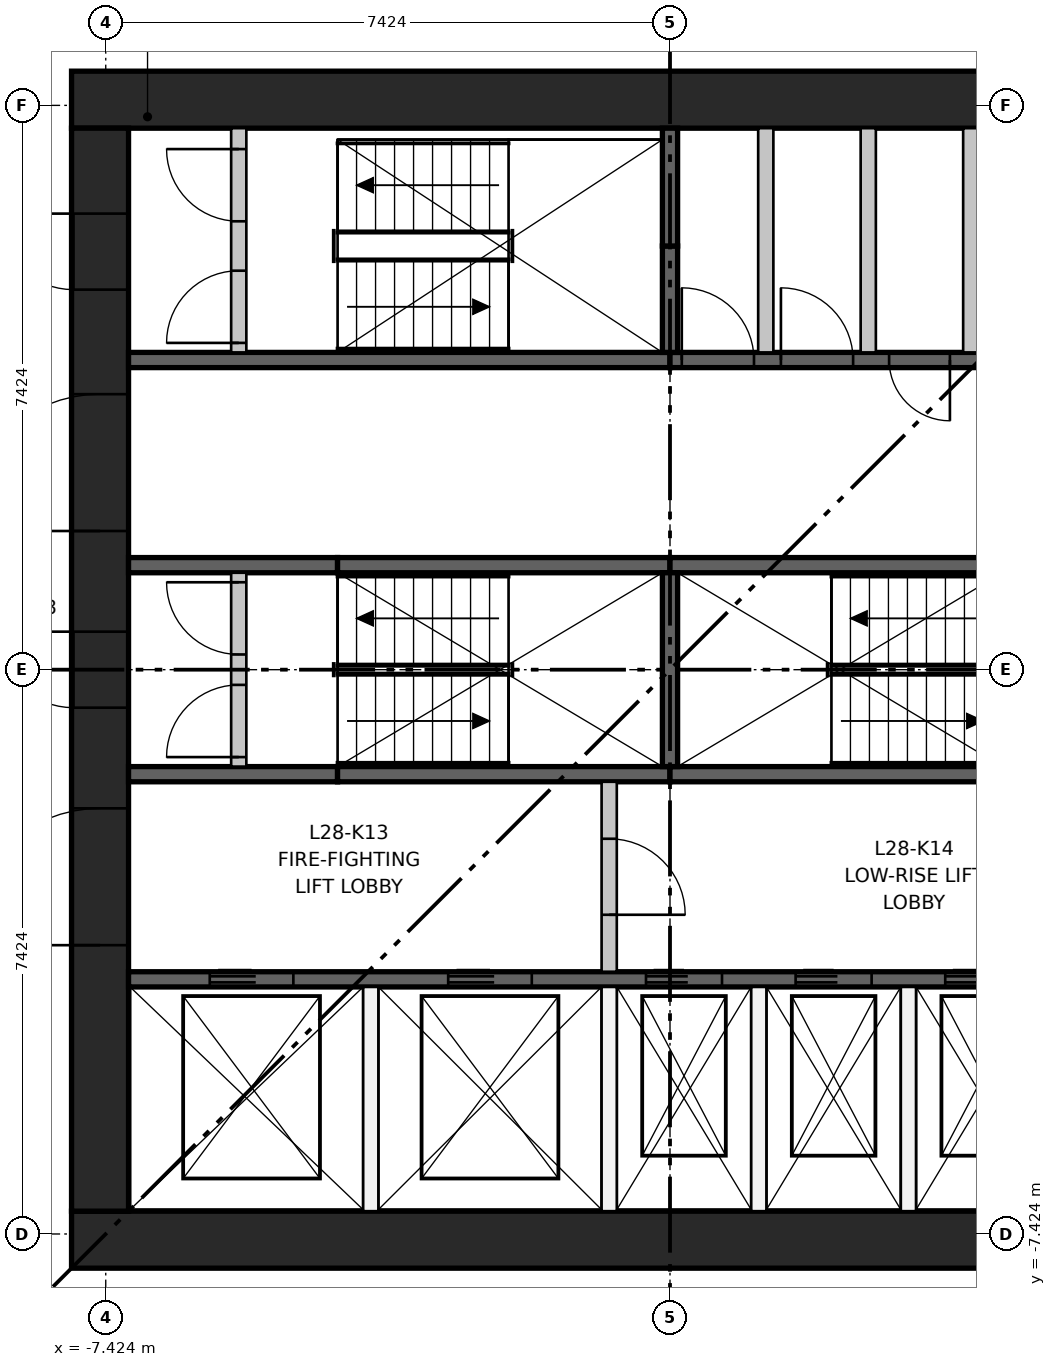
"""IFC4 building model, lengths in metres.
Left out: names, types, materials, properties, quantities, classifications, styles, units other than length and angle.
Written with IfcOpenShell. Run it as: python <this file> out.ifc"""

import sys

from ifc_helpers import new_model, si_unit, direction, frame, frame_2d, origin, place, context, subcontext, project, spatial, rectangle, extrude, element, fill, save


model = new_model("IFC4")
c1 = context("Model", 3, precision=1e-05, world=origin(), true_north=direction((0.0, 1.0)))
c2 = subcontext(c1, "Body", "Model", "MODEL_VIEW")
j1 = project(units=[si_unit("LENGTHUNIT", "METRE"), si_unit("PLANEANGLEUNIT", "RADIAN")], contexts=[c1])
p1 = place(None, origin())
s1 = spatial("IfcSite", under=j1, at=p1, CompositionType="ELEMENT")
p2 = place(p1, origin())
s2 = spatial("IfcBuilding", under=s1, at=p2, CompositionType="ELEMENT")
p3 = place(p2, frame((0.0, 0.0, 109.25)))
s3 = spatial("IfcBuildingStorey", under=s2, at=p3, CompositionType="ELEMENT", Elevation=109.25)
for number, where, z_axis, x_axis in (
    (1, (-7.874, -7.499, 0.0), (0.0, 0.0, 1.0), (1.0, 0.0, 0.0)),
    (2, (-7.874, 7.499, 0.0), (0.0, 0.0, 1.0), (1.0, 0.0, 0.0)),
):
    element("IfcWall", number, at=place(p3, frame(where, z_axis=z_axis, x_axis=x_axis)), inside=s3, PredefinedType="SHEAR", context=c2, shape_type="SweptSolid", body=[
        extrude(rectangle(XDim=15.748, YDim=0.75, at=frame_2d((7.874, 0.0))), origin(), (0.0, 0.0, 1.0), 3.65),
    ])
p4 = place(p3, frame((-7.499, -7.124, 0.0), z_axis=(0.0, 0.0, 1.0), x_axis=(0.0, 1.0, 0.0)))
e3 = element("IfcWall", 3, at=p4, inside=s3, PredefinedType="SHEAR", context=c2, shape_type="SweptSolid", body=[
    extrude(rectangle(XDim=14.248, YDim=0.75, at=frame_2d((7.124, 0.0))), origin(), (0.0, 0.0, 1.0), 3.65),
])
p5 = place(p4, frame((6.624, 0.0, 0.0)))
e4 = element("IfcOpeningElement", 4, at=p5, cuts=e3, PredefinedType="OPENING", context=c2, shape_type="SweptSolid", body=[
    extrude(rectangle(XDim=1.0, YDim=2.1, at=frame_2d((0.5, 1.05))), frame((0.0, 0.385, 0.0), z_axis=(0.0, -1.0, 0.0), x_axis=(1.0, 0.0, 0.0)), (0.0, 0.0, 1.0), 0.77),
])
p6 = place(p4, frame((3.5, 0.0, 0.0)))
e5 = element("IfcOpeningElement", 5, at=p6, cuts=e3, PredefinedType="OPENING", context=c2, shape_type="SweptSolid", body=[
    extrude(rectangle(XDim=1.8, YDim=2.1, at=frame_2d((0.9, 1.05))), frame((0.0, 0.385, 0.0), z_axis=(0.0, -1.0, 0.0), x_axis=(1.0, 0.0, 0.0)), (0.0, 0.0, 1.0), 0.77),
])
p7 = place(p4, frame((8.948, 0.0, 0.0)))
e6 = element("IfcOpeningElement", 6, at=p7, cuts=e3, PredefinedType="OPENING", context=c2, shape_type="SweptSolid", body=[
    extrude(rectangle(XDim=1.8, YDim=2.1, at=frame_2d((0.9, 1.05))), frame((0.0, 0.385, 0.0), z_axis=(0.0, -1.0, 0.0), x_axis=(1.0, 0.0, 0.0)), (0.0, 0.0, 1.0), 0.77),
])
p8 = place(p4, frame((12.124, 0.0, 0.0)))
e7 = element("IfcOpeningElement", 7, at=p8, cuts=e3, PredefinedType="OPENING", context=c2, shape_type="SweptSolid", body=[
    extrude(rectangle(XDim=1.0, YDim=2.1, at=frame_2d((0.5, 1.05))), frame((0.0, 0.385, 0.0), z_axis=(0.0, -1.0, 0.0), x_axis=(1.0, 0.0, 0.0)), (0.0, 0.0, 1.0), 0.77),
])
p9 = place(p3, frame((-7.124, -4.074, 0.0), z_axis=(0.0, 0.0, 1.0), x_axis=(1.0, 0.0, 0.0)))
e8 = element("IfcWall", 8, at=p9, inside=s3, PredefinedType="SHEAR", context=c2, shape_type="SweptSolid", body=[
    extrude(rectangle(XDim=14.248, YDim=0.2, at=frame_2d((7.124, 0.0))), origin(), (0.0, 0.0, 1.0), 3.3),
])
p10 = place(p9, frame((1.069, 0.0, 0.0)))
e9 = element("IfcOpeningElement", 9, at=p10, cuts=e8, PredefinedType="OPENING", context=c2, shape_type="SweptSolid", body=[
    extrude(rectangle(XDim=1.1, YDim=2.1, at=frame_2d((0.55, 1.05))), frame((0.0, 0.11, 0.0), z_axis=(0.0, -1.0, 0.0), x_axis=(1.0, 0.0, 0.0)), (0.0, 0.0, 1.0), 0.22),
])
p11 = place(p9, frame((4.206, 0.0, 0.0)))
e10 = element("IfcOpeningElement", 10, at=p11, cuts=e8, PredefinedType="OPENING", context=c2, shape_type="SweptSolid", body=[
    extrude(rectangle(XDim=1.1, YDim=2.1, at=frame_2d((0.55, 1.05))), frame((0.0, 0.11, 0.0), z_axis=(0.0, -1.0, 0.0), x_axis=(1.0, 0.0, 0.0)), (0.0, 0.0, 1.0), 0.22),
])
p12 = place(p9, frame((6.808, 0.0, 0.0)))
e11 = element("IfcOpeningElement", 11, at=p12, cuts=e8, PredefinedType="OPENING", context=c2, shape_type="SweptSolid", body=[
    extrude(rectangle(XDim=1.0, YDim=2.1, at=frame_2d((0.5, 1.05))), frame((0.0, 0.11, 0.0), z_axis=(0.0, -1.0, 0.0), x_axis=(1.0, 0.0, 0.0)), (0.0, 0.0, 1.0), 0.22),
])
p13 = place(p9, frame((8.777, 0.0, 0.0)))
e12 = element("IfcOpeningElement", 12, at=p13, cuts=e8, PredefinedType="OPENING", context=c2, shape_type="SweptSolid", body=[
    extrude(rectangle(XDim=1.0, YDim=2.1, at=frame_2d((0.5, 1.05))), frame((0.0, 0.11, 0.0), z_axis=(0.0, -1.0, 0.0), x_axis=(1.0, 0.0, 0.0)), (0.0, 0.0, 1.0), 0.22),
])
p14 = place(p9, frame((10.745, 0.0, 0.0)))
e13 = element("IfcOpeningElement", 13, at=p14, cuts=e8, PredefinedType="OPENING", context=c2, shape_type="SweptSolid", body=[
    extrude(rectangle(XDim=1.0, YDim=2.1, at=frame_2d((0.5, 1.05))), frame((0.0, 0.11, 0.0), z_axis=(0.0, -1.0, 0.0), x_axis=(1.0, 0.0, 0.0)), (0.0, 0.0, 1.0), 0.22),
])
p15 = place(p9, frame((12.714, 0.0, 0.0)))
e14 = element("IfcOpeningElement", 14, at=p15, cuts=e8, PredefinedType="OPENING", context=c2, shape_type="SweptSolid", body=[
    extrude(rectangle(XDim=1.0, YDim=2.1, at=frame_2d((0.5, 1.05))), frame((0.0, 0.11, 0.0), z_axis=(0.0, -1.0, 0.0), x_axis=(1.0, 0.0, 0.0)), (0.0, 0.0, 1.0), 0.22),
])
p16 = place(p3, frame((-7.124, 4.074, 0.0), z_axis=(0.0, 0.0, 1.0), x_axis=(1.0, 0.0, 0.0)))
e15 = element("IfcWall", 15, at=p16, inside=s3, PredefinedType="SHEAR", context=c2, shape_type="SweptSolid", body=[
    extrude(rectangle(XDim=7.124, YDim=0.2, at=frame_2d((3.562, 0.0))), origin(), (0.0, 0.0, 1.0), 3.3),
])
p17 = place(p3, frame((0.0, 4.074, 0.0), z_axis=(0.0, 0.0, 1.0), x_axis=(1.0, 0.0, 0.0)))
e16 = element("IfcWall", 16, at=p17, inside=s3, PredefinedType="SHEAR", context=c2, shape_type="SweptSolid", body=[
    extrude(rectangle(XDim=7.124, YDim=0.2, at=frame_2d((3.562, 0.0))), origin(), (0.0, 0.0, 1.0), 3.3),
])
p18 = place(p17, frame((0.155, 0.0, 0.0)))
e17 = element("IfcOpeningElement", 17, at=p18, cuts=e16, PredefinedType="OPENING", context=c2, shape_type="SweptSolid", body=[
    extrude(rectangle(XDim=0.95, YDim=2.1, at=frame_2d((0.475, 1.05))), frame((0.0, 0.11, 0.0), z_axis=(0.0, -1.0, 0.0), x_axis=(1.0, 0.0, 0.0)), (0.0, 0.0, 1.0), 0.22),
])
p19 = place(p17, frame((1.459, 0.0, 0.0)))
e18 = element("IfcOpeningElement", 18, at=p19, cuts=e16, PredefinedType="OPENING", context=c2, shape_type="SweptSolid", body=[
    extrude(rectangle(XDim=0.95, YDim=2.1, at=frame_2d((0.475, 1.05))), frame((0.0, 0.11, 0.0), z_axis=(0.0, -1.0, 0.0), x_axis=(1.0, 0.0, 0.0)), (0.0, 0.0, 1.0), 0.22),
])
p20 = place(p17, frame((2.883, 0.0, 0.0)))
e19 = element("IfcOpeningElement", 19, at=p20, cuts=e16, PredefinedType="OPENING", context=c2, shape_type="SweptSolid", body=[
    extrude(rectangle(XDim=0.8, YDim=2.1, at=frame_2d((0.4, 1.05))), frame((0.0, 0.11, 0.0), z_axis=(0.0, -1.0, 0.0), x_axis=(1.0, 0.0, 0.0)), (0.0, 0.0, 1.0), 0.22),
])
p21 = place(p17, frame((4.156, 0.0, 0.0)))
e20 = element("IfcOpeningElement", 20, at=p21, cuts=e16, PredefinedType="OPENING", context=c2, shape_type="SweptSolid", body=[
    extrude(rectangle(XDim=0.95, YDim=2.1, at=frame_2d((0.475, 1.05))), frame((0.0, 0.11, 0.0), z_axis=(0.0, -1.0, 0.0), x_axis=(1.0, 0.0, 0.0)), (0.0, 0.0, 1.0), 0.22),
])
p22 = place(p17, frame((5.79, 0.0, 0.0)))
e21 = element("IfcOpeningElement", 21, at=p22, cuts=e16, PredefinedType="OPENING", context=c2, shape_type="SweptSolid", body=[
    extrude(rectangle(XDim=0.8, YDim=2.1, at=frame_2d((0.4, 1.05))), frame((0.0, 0.11, 0.0), z_axis=(0.0, -1.0, 0.0), x_axis=(1.0, 0.0, 0.0)), (0.0, 0.0, 1.0), 0.22),
])
p23 = place(p3, frame((-7.124, -1.375, 0.0), z_axis=(0.0, 0.0, 1.0), x_axis=(1.0, 0.0, 0.0)))
e22 = element("IfcWall", 22, at=p23, inside=s3, PredefinedType="SHEAR", context=c2, shape_type="SweptSolid", body=[
    extrude(rectangle(XDim=2.75, YDim=0.2, at=frame_2d((1.375, 0.0))), origin(), (0.0, 0.0, 1.0), 3.3),
])
for number, where, z_axis, x_axis in (
    (23, (-4.374, -1.375, 0.0), (0.0, 0.0, 1.0), (1.0, 0.0, 0.0)),
    (24, (0.0, -1.375, 0.0), (0.0, 0.0, 1.0), (1.0, 0.0, 0.0)),
):
    element("IfcWall", number, at=place(p3, frame(where, z_axis=z_axis, x_axis=x_axis)), inside=s3, PredefinedType="SHEAR", context=c2, shape_type="SweptSolid", body=[
        extrude(rectangle(XDim=4.374, YDim=0.2, at=frame_2d((2.187, 0.0))), origin(), (0.0, 0.0, 1.0), 3.3),
    ])
p24 = place(p3, frame((-7.124, 1.375, 0.0), z_axis=(0.0, 0.0, 1.0), x_axis=(1.0, 0.0, 0.0)))
e25 = element("IfcWall", 25, at=p24, inside=s3, PredefinedType="SHEAR", context=c2, shape_type="SweptSolid", body=[
    extrude(rectangle(XDim=2.75, YDim=0.2, at=frame_2d((1.375, 0.0))), origin(), (0.0, 0.0, 1.0), 3.3),
])
for number, where, z_axis, x_axis in (
    (26, (-4.374, 1.375, 0.0), (0.0, 0.0, 1.0), (1.0, 0.0, 0.0)),
    (27, (0.0, 1.375, 0.0), (0.0, 0.0, 1.0), (1.0, 0.0, 0.0)),
):
    element("IfcWall", number, at=place(p3, frame(where, z_axis=z_axis, x_axis=x_axis)), inside=s3, PredefinedType="SHEAR", context=c2, shape_type="SweptSolid", body=[
        extrude(rectangle(XDim=4.374, YDim=0.2, at=frame_2d((2.187, 0.0))), origin(), (0.0, 0.0, 1.0), 3.3),
    ])
p25 = place(p3, frame((0.0, -1.275, 0.0), z_axis=(0.0, 0.0, 1.0), x_axis=(0.0, 1.0, 0.0)))
e28 = element("IfcWall", 28, at=p25, inside=s3, PredefinedType="SHEAR", context=c2, shape_type="SweptSolid", body=[
    extrude(rectangle(XDim=2.55, YDim=0.2, at=frame_2d((1.275, 0.0))), origin(), (0.0, 0.0, 1.0), 3.3),
])
for number, where, z_axis, x_axis in (
    (29, (-3.937, -7.124, 0.0), (0.0, 0.0, 1.0), (0.0, 1.0, 0.0)),
    (30, (-0.8, -7.124, 0.0), (0.0, 0.0, 1.0), (0.0, 1.0, 0.0)),
):
    element("IfcWall", number, at=place(p3, frame(where, z_axis=z_axis, x_axis=x_axis)), inside=s3, PredefinedType="PARTITIONING", context=c2, shape_type="SweptSolid", body=[
        extrude(rectangle(XDim=2.95, YDim=0.2, at=frame_2d((1.475, 0.0))), origin(), (0.0, 0.0, 1.0), 3.3),
    ])
p26 = place(p3, frame((-0.8, -3.974, 0.0), z_axis=(0.0, 0.0, 1.0), x_axis=(0.0, 1.0, 0.0)))
e31 = element("IfcWall", 31, at=p26, inside=s3, PredefinedType="PARTITIONING", context=c2, shape_type="SweptSolid", body=[
    extrude(rectangle(XDim=2.499, YDim=0.2, at=frame_2d((1.25, 0.0))), origin(), (0.0, 0.0, 1.0), 3.3),
])
p27 = place(p26, frame((0.75, 0.0, 0.0)))
e32 = element("IfcOpeningElement", 32, at=p27, cuts=e31, PredefinedType="OPENING", context=c2, shape_type="SweptSolid", body=[
    extrude(rectangle(XDim=1.0, YDim=2.1, at=frame_2d((0.5, 1.05))), frame((0.0, 0.11, 0.0), z_axis=(0.0, -1.0, 0.0), x_axis=(1.0, 0.0, 0.0)), (0.0, 0.0, 1.0), 0.22),
])
for number, where, z_axis, x_axis in (
    (33, (1.168, -7.124, 0.0), (0.0, 0.0, 1.0), (0.0, 1.0, 0.0)),
    (34, (3.137, -7.124, 0.0), (0.0, 0.0, 1.0), (0.0, 1.0, 0.0)),
):
    element("IfcWall", number, at=place(p3, frame(where, z_axis=z_axis, x_axis=x_axis)), inside=s3, PredefinedType="PARTITIONING", context=c2, shape_type="SweptSolid", body=[
        extrude(rectangle(XDim=2.95, YDim=0.2, at=frame_2d((1.475, 0.0))), origin(), (0.0, 0.0, 1.0), 3.3),
    ])
p28 = place(p3, frame((0.0, 4.174, 0.0), z_axis=(0.0, 0.0, 1.0), x_axis=(0.0, 1.0, 0.0)))
e35 = element("IfcWall", 35, at=p28, inside=s3, PredefinedType="SHEAR", context=c2, shape_type="SweptSolid", body=[
    extrude(rectangle(XDim=1.4, YDim=0.2, at=frame_2d((0.7, 0.0))), origin(), (0.0, 0.0, 1.0), 3.3),
])
p29 = place(p3, frame((0.0, 5.574, 0.0), z_axis=(0.0, 0.0, 1.0), x_axis=(0.0, 1.0, 0.0)))
e36 = element("IfcWall", 36, at=p29, inside=s3, PredefinedType="SHEAR", context=c2, shape_type="SweptSolid", body=[
    extrude(rectangle(XDim=1.55, YDim=0.2, at=frame_2d((0.775, 0.0))), origin(), (0.0, 0.0, 1.0), 3.3),
])
for number, where, z_axis, x_axis in (
    (37, (1.26, 4.174, 0.0), (0.0, 0.0, 1.0), (0.0, 1.0, 0.0)),
    (38, (2.609, 4.174, 0.0), (0.0, 0.0, 1.0), (0.0, 1.0, 0.0)),
    (39, (3.957, 4.174, 0.0), (0.0, 0.0, 1.0), (0.0, 1.0, 0.0)),
):
    element("IfcWall", number, at=place(p3, frame(where, z_axis=z_axis, x_axis=x_axis)), inside=s3, PredefinedType="PARTITIONING", context=c2, shape_type="SweptSolid", body=[
        extrude(rectangle(XDim=2.95, YDim=0.2, at=frame_2d((1.475, 0.0))), origin(), (0.0, 0.0, 1.0), 3.3),
    ])
p30 = place(p3, frame((-5.674, -1.275, 0.0), z_axis=(0.0, 0.0, 1.0), x_axis=(0.0, 1.0, 0.0)))
e40 = element("IfcWall", 40, at=p30, inside=s3, PredefinedType="PARTITIONING", context=c2, shape_type="SweptSolid", body=[
    extrude(rectangle(XDim=2.55, YDim=0.2, at=frame_2d((1.275, 0.0))), origin(), (0.0, 0.0, 1.0), 3.3),
])
p31 = place(p30, frame((0.125, 0.0, 0.0)))
e41 = element("IfcOpeningElement", 41, at=p31, cuts=e40, PredefinedType="OPENING", context=c2, shape_type="SweptSolid", body=[
    extrude(rectangle(XDim=0.95, YDim=2.1, at=frame_2d((0.475, 1.05))), frame((0.0, 0.11, 0.0), z_axis=(0.0, -1.0, 0.0), x_axis=(1.0, 0.0, 0.0)), (0.0, 0.0, 1.0), 0.22),
])
p32 = place(p30, frame((1.475, 0.0, 0.0)))
e42 = element("IfcOpeningElement", 42, at=p32, cuts=e40, PredefinedType="OPENING", context=c2, shape_type="SweptSolid", body=[
    extrude(rectangle(XDim=0.95, YDim=2.1, at=frame_2d((0.475, 1.05))), frame((0.0, 0.11, 0.0), z_axis=(0.0, -1.0, 0.0), x_axis=(1.0, 0.0, 0.0)), (0.0, 0.0, 1.0), 0.22),
])
p33 = place(p3, frame((-5.674, 4.174, 0.0), z_axis=(0.0, 0.0, 1.0), x_axis=(0.0, 1.0, 0.0)))
e43 = element("IfcWall", 43, at=p33, inside=s3, PredefinedType="PARTITIONING", context=c2, shape_type="SweptSolid", body=[
    extrude(rectangle(XDim=2.95, YDim=0.2, at=frame_2d((1.475, 0.0))), origin(), (0.0, 0.0, 1.0), 3.3),
])
p34 = place(p33, frame((0.125, 0.0, 0.0)))
e44 = element("IfcOpeningElement", 44, at=p34, cuts=e43, PredefinedType="OPENING", context=c2, shape_type="SweptSolid", body=[
    extrude(rectangle(XDim=0.95, YDim=2.1, at=frame_2d((0.475, 1.05))), frame((0.0, 0.11, 0.0), z_axis=(0.0, -1.0, 0.0), x_axis=(1.0, 0.0, 0.0)), (0.0, 0.0, 1.0), 0.22),
])
p35 = place(p33, frame((1.725, 0.0, 0.0)))
e45 = element("IfcOpeningElement", 45, at=p35, cuts=e43, PredefinedType="OPENING", context=c2, shape_type="SweptSolid", body=[
    extrude(rectangle(XDim=0.95, YDim=2.1, at=frame_2d((0.475, 1.05))), frame((0.0, 0.11, 0.0), z_axis=(0.0, -1.0, 0.0), x_axis=(1.0, 0.0, 0.0)), (0.0, 0.0, 1.0), 0.22),
])
p36 = place(p10, origin())
e46 = element("IfcDoor", 46, at=p36, inside=s3, OperationType="DOUBLE_DOOR_SLIDING", PredefinedType="DOOR", context=c2, shape_type="SweptSolid", body=[
    extrude(rectangle(XDim=1.1, YDim=2.1, at=frame_2d((0.55, 1.05))), frame((0.0, 0.025, 0.0), z_axis=(0.0, -1.0, 0.0), x_axis=(1.0, 0.0, 0.0)), (0.0, 0.0, 1.0), 0.05),
])
fill(e9, e46)
p37 = place(p11, origin())
e47 = element("IfcDoor", 47, at=p37, inside=s3, OperationType="DOUBLE_DOOR_SLIDING", PredefinedType="DOOR", context=c2, shape_type="SweptSolid", body=[
    extrude(rectangle(XDim=1.1, YDim=2.1, at=frame_2d((0.55, 1.05))), frame((0.0, 0.025, 0.0), z_axis=(0.0, -1.0, 0.0), x_axis=(1.0, 0.0, 0.0)), (0.0, 0.0, 1.0), 0.05),
])
fill(e10, e47)
p38 = place(p12, origin())
e48 = element("IfcDoor", 48, at=p38, inside=s3, OperationType="DOUBLE_DOOR_SLIDING", PredefinedType="DOOR", context=c2, shape_type="SweptSolid", body=[
    extrude(rectangle(XDim=1.0, YDim=2.1, at=frame_2d((0.5, 1.05))), frame((0.0, 0.025, 0.0), z_axis=(0.0, -1.0, 0.0), x_axis=(1.0, 0.0, 0.0)), (0.0, 0.0, 1.0), 0.05),
])
fill(e11, e48)
p39 = place(p13, origin())
e49 = element("IfcDoor", 49, at=p39, inside=s3, OperationType="DOUBLE_DOOR_SLIDING", PredefinedType="DOOR", context=c2, shape_type="SweptSolid", body=[
    extrude(rectangle(XDim=1.0, YDim=2.1, at=frame_2d((0.5, 1.05))), frame((0.0, 0.025, 0.0), z_axis=(0.0, -1.0, 0.0), x_axis=(1.0, 0.0, 0.0)), (0.0, 0.0, 1.0), 0.05),
])
fill(e12, e49)
p40 = place(p14, origin())
e50 = element("IfcDoor", 50, at=p40, inside=s3, OperationType="DOUBLE_DOOR_SLIDING", PredefinedType="DOOR", context=c2, shape_type="SweptSolid", body=[
    extrude(rectangle(XDim=1.0, YDim=2.1, at=frame_2d((0.5, 1.05))), frame((0.0, 0.025, 0.0), z_axis=(0.0, -1.0, 0.0), x_axis=(1.0, 0.0, 0.0)), (0.0, 0.0, 1.0), 0.05),
])
fill(e13, e50)
p41 = place(p31, origin())
e51 = element("IfcDoor", 51, at=p41, inside=s3, OperationType="SINGLE_SWING_LEFT", PredefinedType="DOOR", context=c2, shape_type="SweptSolid", body=[
    extrude(rectangle(XDim=0.95, YDim=2.1, at=frame_2d((0.475, 1.05))), frame((0.0, 0.025, 0.0), z_axis=(0.0, -1.0, 0.0), x_axis=(1.0, 0.0, 0.0)), (0.0, 0.0, 1.0), 0.05),
])
fill(e41, e51)
p42 = place(p32, origin())
e52 = element("IfcDoor", 52, at=p42, inside=s3, OperationType="SINGLE_SWING_RIGHT", PredefinedType="DOOR", context=c2, shape_type="SweptSolid", body=[
    extrude(rectangle(XDim=0.95, YDim=2.1, at=frame_2d((0.475, 1.05))), frame((0.0, 0.025, 0.0), z_axis=(0.0, -1.0, 0.0), x_axis=(1.0, 0.0, 0.0)), (0.0, 0.0, 1.0), 0.05),
])
fill(e42, e52)
p43 = place(p34, origin())
e53 = element("IfcDoor", 53, at=p43, inside=s3, OperationType="SINGLE_SWING_LEFT", PredefinedType="DOOR", context=c2, shape_type="SweptSolid", body=[
    extrude(rectangle(XDim=0.95, YDim=2.1, at=frame_2d((0.475, 1.05))), frame((0.0, 0.025, 0.0), z_axis=(0.0, -1.0, 0.0), x_axis=(1.0, 0.0, 0.0)), (0.0, 0.0, 1.0), 0.05),
])
fill(e44, e53)
p44 = place(p35, origin())
e54 = element("IfcDoor", 54, at=p44, inside=s3, OperationType="SINGLE_SWING_RIGHT", PredefinedType="DOOR", context=c2, shape_type="SweptSolid", body=[
    extrude(rectangle(XDim=0.95, YDim=2.1, at=frame_2d((0.475, 1.05))), frame((0.0, 0.025, 0.0), z_axis=(0.0, -1.0, 0.0), x_axis=(1.0, 0.0, 0.0)), (0.0, 0.0, 1.0), 0.05),
])
fill(e45, e54)
p45 = place(p27, frame((1.0, 0.0, 0.0), z_axis=(0.0, 0.0, 1.0), x_axis=(-1.0, 0.0, 0.0)))
e55 = element("IfcDoor", 55, at=p45, inside=s3, OperationType="SINGLE_SWING_LEFT", PredefinedType="DOOR", context=c2, shape_type="SweptSolid", body=[
    extrude(rectangle(XDim=1.0, YDim=2.1, at=frame_2d((0.5, 1.05))), frame((0.0, 0.025, 0.0), z_axis=(0.0, -1.0, 0.0), x_axis=(1.0, 0.0, 0.0)), (0.0, 0.0, 1.0), 0.05),
])
fill(e32, e55)
p46 = place(p18, origin())
e56 = element("IfcDoor", 56, at=p46, inside=s3, OperationType="SINGLE_SWING_LEFT", PredefinedType="DOOR", context=c2, shape_type="SweptSolid", body=[
    extrude(rectangle(XDim=0.95, YDim=2.1, at=frame_2d((0.475, 1.05))), frame((0.0, 0.025, 0.0), z_axis=(0.0, -1.0, 0.0), x_axis=(1.0, 0.0, 0.0)), (0.0, 0.0, 1.0), 0.05),
])
fill(e17, e56)
p47 = place(p19, origin())
e57 = element("IfcDoor", 57, at=p47, inside=s3, OperationType="SINGLE_SWING_LEFT", PredefinedType="DOOR", context=c2, shape_type="SweptSolid", body=[
    extrude(rectangle(XDim=0.95, YDim=2.1, at=frame_2d((0.475, 1.05))), frame((0.0, 0.025, 0.0), z_axis=(0.0, -1.0, 0.0), x_axis=(1.0, 0.0, 0.0)), (0.0, 0.0, 1.0), 0.05),
])
fill(e18, e57)
p48 = place(p20, frame((0.8, 0.0, 0.0), z_axis=(0.0, 0.0, 1.0), x_axis=(-1.0, 0.0, 0.0)))
e58 = element("IfcDoor", 58, at=p48, inside=s3, OperationType="SINGLE_SWING_RIGHT", PredefinedType="DOOR", context=c2, shape_type="SweptSolid", body=[
    extrude(rectangle(XDim=0.8, YDim=2.1, at=frame_2d((0.4, 1.05))), frame((0.0, 0.025, 0.0), z_axis=(0.0, -1.0, 0.0), x_axis=(1.0, 0.0, 0.0)), (0.0, 0.0, 1.0), 0.05),
])
fill(e19, e58)
p49 = place(p5, origin())
e59 = element("IfcDoor", 59, at=p49, inside=s3, OperationType="SINGLE_SWING_RIGHT", PredefinedType="DOOR", context=c2, shape_type="SweptSolid", body=[
    extrude(rectangle(XDim=1.0, YDim=2.1, at=frame_2d((0.5, 1.05))), frame((0.0, 0.375, 0.0), z_axis=(0.0, -1.0, 0.0), x_axis=(1.0, 0.0, 0.0)), (0.0, 0.0, 1.0), 0.05),
])
fill(e4, e59)
p50 = place(p6, origin())
e60 = element("IfcDoor", 60, at=p50, inside=s3, OperationType="DOUBLE_DOOR_SINGLE_SWING", PredefinedType="DOOR", context=c2, shape_type="SweptSolid", body=[
    extrude(rectangle(XDim=1.8, YDim=2.1, at=frame_2d((0.9, 1.05))), frame((0.0, 0.025, 0.0), z_axis=(0.0, -1.0, 0.0), x_axis=(1.0, 0.0, 0.0)), (0.0, 0.0, 1.0), 0.05),
])
fill(e5, e60)
p51 = place(p7, origin())
e61 = element("IfcDoor", 61, at=p51, inside=s3, OperationType="DOUBLE_DOOR_SINGLE_SWING", PredefinedType="DOOR", context=c2, shape_type="SweptSolid", body=[
    extrude(rectangle(XDim=1.8, YDim=2.1, at=frame_2d((0.9, 1.05))), frame((0.0, 0.025, 0.0), z_axis=(0.0, -1.0, 0.0), x_axis=(1.0, 0.0, 0.0)), (0.0, 0.0, 1.0), 0.05),
])
fill(e6, e61)
p52 = place(p8, origin())
e62 = element("IfcDoor", 62, at=p52, inside=s3, OperationType="SINGLE_SWING_RIGHT", PredefinedType="DOOR", context=c2, shape_type="SweptSolid", body=[
    extrude(rectangle(XDim=1.0, YDim=2.1, at=frame_2d((0.5, 1.05))), frame((0.0, 0.375, 0.0), z_axis=(0.0, -1.0, 0.0), x_axis=(1.0, 0.0, 0.0)), (0.0, 0.0, 1.0), 0.05),
])
fill(e7, e62)
save(model, sys.argv[1])
